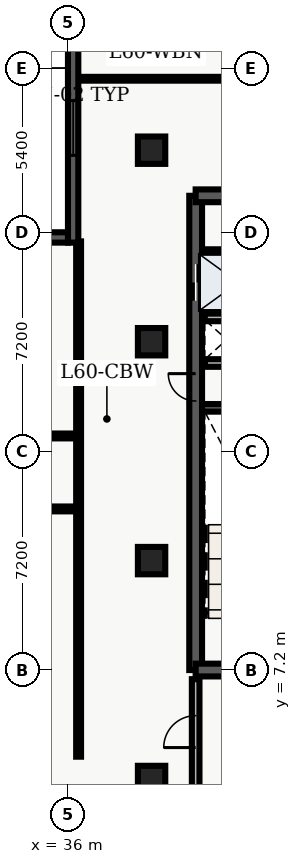
"""IFC4 building model, lengths in metres.
Left out: names, types, materials, properties, quantities, classifications, styles, units other than length and angle.
Written with IfcOpenShell. Run it as: python <this file> out.ifc"""

import sys

from ifc_helpers import new_model, entity, si_unit, converted_unit, direction, frame, origin_with_axes, origin_2d_with_axis, place, context, subcontext, project, spatial, polyline, rectangle, outline, extrude, element, fill, save


model = new_model("IFC4")
c1 = context("Model", 3, precision=1e-05, world=origin_with_axes(), true_north=direction((0.0, 1.0)))
c2 = subcontext(c1, "Body", "Model", "MODEL_VIEW")
j1 = project(units=[si_unit("LENGTHUNIT", "METRE"), converted_unit("PLANEANGLEUNIT", "DEGREE", entity("IfcPlaneAngleMeasure", 0.017), si_unit("PLANEANGLEUNIT", "RADIAN"), dimensions=[0, 0, 0, 0, 0, 0, 0])], contexts=[c1])
p1 = place(None, origin_with_axes())
s1 = spatial("IfcSite", under=j1, at=p1, CompositionType="ELEMENT")
p2 = place(p1, origin_with_axes())
s2 = spatial("IfcBuilding", under=s1, at=p2, CompositionType="ELEMENT")
p3 = place(p2, frame((0.0, 0.0, 244.2), z_axis=(0.0, 0.0, 1.0), x_axis=(1.0, 0.0, 0.0)))
s3 = spatial("IfcBuildingStorey", under=s2, at=p3, CompositionType="ELEMENT", Elevation=244.2)
p4 = place(p3, frame((40.2, 7.2, 0.0), z_axis=(0.0, 0.0, 1.0), x_axis=(0.0, 1.0, 0.0)))
e1 = element("IfcWall", 1, at=p4, inside=s3, PredefinedType="SHEAR", context=c2, shape_type="SweptSolid", body=[
    extrude(outline(polyline([(0.0, -0.21), (15.6, -0.21), (15.6, 0.21), (0.0, 0.21), (0.0, -0.21)])), origin_with_axes(), (0.0, 0.0, 1.0), 3.6),
])
p5 = place(p4, frame((12.75, 0.0, 0.0), z_axis=(0.0, 0.0, 1.0), x_axis=(1.0, 0.0, 0.0)))
e2 = element("IfcOpeningElement", 2, at=p5, cuts=e1, PredefinedType="OPENING", context=c2, shape_type="SweptSolid", body=[
    extrude(rectangle(XDim=1.2, YDim=0.44, at=origin_2d_with_axis()), origin_with_axes(), (0.0, 0.0, 1.0), 2.15),
])
p6 = place(p4, frame((9.3, 0.0, 0.0), z_axis=(0.0, 0.0, 1.0), x_axis=(1.0, 0.0, 0.0)))
e3 = element("IfcOpeningElement", 3, at=p6, cuts=e1, PredefinedType="OPENING", context=c2, shape_type="SweptSolid", body=[
    extrude(rectangle(XDim=0.9, YDim=0.44, at=origin_2d_with_axis()), origin_with_axes(), (0.0, 0.0, 1.0), 2.15),
])
p7 = place(p3, frame((40.2, 7.2, 0.0), z_axis=(0.0, 0.0, 1.0), x_axis=(1.0, 0.0, 0.0)))
e4 = element("IfcWall", 4, at=p7, inside=s3, PredefinedType="SHEAR", context=c2, shape_type="SweptSolid", body=[
    extrude(outline(polyline([(0.0, -0.21), (7.85, -0.21), (7.85, 0.21), (0.0, 0.21), (0.0, -0.21)])), origin_with_axes(), (0.0, 0.0, 1.0), 3.6),
])
p8 = place(p7, frame((2.175, 0.0, 0.0), z_axis=(0.0, 0.0, 1.0), x_axis=(1.0, 0.0, 0.0)))
e5 = element("IfcOpeningElement", 5, at=p8, cuts=e4, PredefinedType="OPENING", context=c2, shape_type="SweptSolid", body=[
    extrude(rectangle(XDim=1.05, YDim=0.44, at=origin_2d_with_axis()), origin_with_axes(), (0.0, 0.0, 1.0), 2.15),
])
p9 = place(p3, frame((40.2, 22.8, 0.0), z_axis=(0.0, 0.0, 1.0), x_axis=(1.0, 0.0, 0.0)))
e6 = element("IfcWall", 6, at=p9, inside=s3, PredefinedType="SHEAR", context=c2, shape_type="SweptSolid", body=[
    extrude(outline(polyline([(0.0, -0.21), (7.85, -0.21), (7.85, 0.21), (0.0, 0.21), (0.0, -0.21)])), origin_with_axes(), (0.0, 0.0, 1.0), 3.6),
])
p10 = place(p9, frame((5.775, 0.0, 0.0), z_axis=(0.0, 0.0, 1.0), x_axis=(1.0, 0.0, 0.0)))
e7 = element("IfcOpeningElement", 7, at=p10, cuts=e6, PredefinedType="OPENING", context=c2, shape_type="SweptSolid", body=[
    extrude(rectangle(XDim=1.05, YDim=0.44, at=origin_2d_with_axis()), origin_with_axes(), (0.0, 0.0, 1.0), 2.15),
])
p11 = place(p9, frame((2.15, 0.0, 0.0), z_axis=(0.0, 0.0, 1.0), x_axis=(1.0, 0.0, 0.0)))
e8 = element("IfcOpeningElement", 8, at=p11, cuts=e6, PredefinedType="OPENING", context=c2, shape_type="SweptSolid", body=[
    extrude(rectangle(XDim=0.9, YDim=0.44, at=origin_2d_with_axis()), origin_with_axes(), (0.0, 0.0, 1.0), 2.15),
])
p12 = place(p3, frame((40.41, 15.825, 0.0), z_axis=(0.0, 0.0, 1.0), x_axis=(1.0, 0.0, 0.0)))
e9 = element("IfcWall", 9, at=p12, inside=s3, PredefinedType="SHEAR", context=c2, shape_type="SweptSolid", body=[
    extrude(outline(polyline([(0.0, -0.125), (3.59, -0.125), (3.59, 0.125), (0.0, 0.125), (0.0, -0.125)])), origin_with_axes(), (0.0, 0.0, 1.0), 3.6),
])
p13 = place(p3, frame((40.5, 17.3, 0.0), z_axis=(0.0, 0.0, 1.0), x_axis=(1.0, 0.0, 0.0)))
e10 = element("IfcWall", 10, at=p13, inside=s3, PredefinedType="SOLIDWALL", context=c2, shape_type="SweptSolid", body=[
    extrude(outline(polyline([(0.0, -0.125), (3.5, -0.125), (3.5, 0.125), (0.0, 0.125), (0.0, -0.125)])), origin_with_axes(), (0.0, 0.0, 1.0), 2.64),
])
p14 = place(p13, frame((2.4, 0.0, 0.0), z_axis=(0.0, 0.0, 1.0), x_axis=(1.0, 0.0, 0.0)))
e11 = element("IfcOpeningElement", 11, at=p14, cuts=e10, PredefinedType="OPENING", context=c2, shape_type="SweptSolid", body=[
    extrude(rectangle(XDim=0.9, YDim=0.27, at=origin_2d_with_axis()), origin_with_axes(), (0.0, 0.0, 1.0), 2.15),
])
p15 = place(p3, frame((40.5, 18.8, 0.0), z_axis=(0.0, 0.0, 1.0), x_axis=(1.0, 0.0, 0.0)))
e12 = element("IfcWall", 12, at=p15, inside=s3, PredefinedType="SOLIDWALL", context=c2, shape_type="SweptSolid", body=[
    extrude(outline(polyline([(0.0, -0.125), (3.5, -0.125), (3.5, 0.125), (0.0, 0.125), (0.0, -0.125)])), origin_with_axes(), (0.0, 0.0, 1.0), 2.64),
])
p16 = place(p3, frame((40.2, 3.1, 0.0), z_axis=(0.0, 0.0, 1.0), x_axis=(0.0, 1.0, 0.0)))
e13 = element("IfcWall", 13, at=p16, inside=s3, PredefinedType="SOLIDWALL", context=c2, shape_type="SweptSolid", body=[
    extrude(outline(polyline([(0.0, -0.125), (3.8, -0.125), (3.8, 0.125), (0.0, 0.125), (0.0, -0.125)])), origin_with_axes(), (0.0, 0.0, 1.0), 2.64),
])
p17 = place(p16, frame((2.075, 0.0, 0.0), z_axis=(0.0, 0.0, 1.0), x_axis=(1.0, 0.0, 0.0)))
e14 = element("IfcOpeningElement", 14, at=p17, cuts=e13, PredefinedType="OPENING", context=c2, shape_type="SweptSolid", body=[
    extrude(rectangle(XDim=1.05, YDim=0.27, at=origin_2d_with_axis()), origin_with_axes(), (0.0, 0.0, 1.0), 2.15),
])
for number, where, z_axis, x_axis in (
    (15, (38.75, 3.6, 0.0), (0.0, 0.0, 1.0), (1.0, 0.0, 0.0)),
    (16, (38.75, 10.8, 0.0), (0.0, 0.0, 1.0), (1.0, 0.0, 0.0)),
    (17, (38.75, 18.0, 0.0), (0.0, 0.0, 1.0), (1.0, 0.0, 0.0)),
    (18, (38.75, 24.3, 0.0), (0.0, 0.0, 1.0), (1.0, 0.0, 0.0)),
):
    element("IfcColumn", number, at=place(p3, frame(where, z_axis=z_axis, x_axis=x_axis)), inside=s3, PredefinedType="COLUMN", context=c2, shape_type="SweptSolid", body=[
        extrude(rectangle(XDim=0.9, YDim=0.9, at=origin_2d_with_axis()), origin_with_axes(), (0.0, 0.0, 1.0), 3.9),
    ])
p18 = place(p3, frame((40.5, 20.96, 0.0), z_axis=(0.0, 0.0, 1.0), x_axis=(1.0, 0.0, 0.0)))
e19 = element("IfcWall", 19, at=p18, inside=s3, PredefinedType="PARTITIONING", context=c2, shape_type="SweptSolid", body=[
    extrude(outline(polyline([(0.0, -0.08), (3.5, -0.08), (3.5, 0.08), (0.0, 0.08), (0.0, -0.08)])), origin_with_axes(), (0.0, 0.0, 1.0), 2.64),
])
p19 = place(p3, frame((20.3, 12.5, 0.0), z_axis=(0.0, 0.0, 1.0), x_axis=(1.0, 0.0, 0.0)))
e20 = element("IfcWall", 20, at=p19, inside=s3, PredefinedType="PARTITIONING", context=c2, shape_type="SweptSolid", body=[
    extrude(outline(polyline([(0.0, -0.08), (16.05, -0.08), (16.05, 0.08), (0.0, 0.08), (0.0, -0.08)])), origin_with_axes(), (0.0, 0.0, 1.0), 2.64),
])
p20 = place(p19, frame((8.075, 0.0, 0.0), z_axis=(0.0, 0.0, 1.0), x_axis=(1.0, 0.0, 0.0)))
e21 = element("IfcOpeningElement", 21, at=p20, cuts=e20, PredefinedType="OPENING", context=c2, shape_type="SweptSolid", body=[
    extrude(rectangle(XDim=1.0, YDim=0.18, at=origin_2d_with_axis()), origin_with_axes(), (0.0, 0.0, 1.0), 2.15),
])
p21 = place(p3, frame((20.3, 14.9, 0.0), z_axis=(0.0, 0.0, 1.0), x_axis=(1.0, 0.0, 0.0)))
e22 = element("IfcWall", 22, at=p21, inside=s3, PredefinedType="PARTITIONING", context=c2, shape_type="SweptSolid", body=[
    extrude(outline(polyline([(0.0, -0.08), (16.05, -0.08), (16.05, 0.08), (0.0, 0.08), (0.0, -0.08)])), origin_with_axes(), (0.0, 0.0, 1.0), 2.64),
])
p22 = place(p21, frame((1.827, 0.0, 0.0), z_axis=(0.0, 0.0, 1.0), x_axis=(1.0, 0.0, 0.0)))
e23 = element("IfcOpeningElement", 23, at=p22, cuts=e22, PredefinedType="OPENING", context=c2, shape_type="SweptSolid", body=[
    extrude(rectangle(XDim=1.0, YDim=0.18, at=origin_2d_with_axis()), origin_with_axes(), (0.0, 0.0, 1.0), 2.15),
])
p23 = place(p21, frame((5.386, 0.0, 0.0), z_axis=(0.0, 0.0, 1.0), x_axis=(1.0, 0.0, 0.0)))
e24 = element("IfcOpeningElement", 24, at=p23, cuts=e22, PredefinedType="OPENING", context=c2, shape_type="SweptSolid", body=[
    extrude(rectangle(XDim=1.0, YDim=0.18, at=origin_2d_with_axis()), origin_with_axes(), (0.0, 0.0, 1.0), 2.15),
])
p24 = place(p21, frame((9.236, 0.0, 0.0), z_axis=(0.0, 0.0, 1.0), x_axis=(1.0, 0.0, 0.0)))
e25 = element("IfcOpeningElement", 25, at=p24, cuts=e22, PredefinedType="OPENING", context=c2, shape_type="SweptSolid", body=[
    extrude(rectangle(XDim=1.0, YDim=0.18, at=origin_2d_with_axis()), origin_with_axes(), (0.0, 0.0, 1.0), 2.15),
])
p25 = place(p21, frame((13.572, 0.0, 0.0), z_axis=(0.0, 0.0, 1.0), x_axis=(1.0, 0.0, 0.0)))
e26 = element("IfcOpeningElement", 26, at=p25, cuts=e22, PredefinedType="OPENING", context=c2, shape_type="SweptSolid", body=[
    extrude(rectangle(XDim=1.0, YDim=0.18, at=origin_2d_with_axis()), origin_with_axes(), (0.0, 0.0, 1.0), 2.15),
])
p26 = place(p3, frame((36.35, 4.35, 0.0), z_axis=(0.0, 0.0, 1.0), x_axis=(0.0, 1.0, 0.0)))
e27 = element("IfcWall", 27, at=p26, inside=s3, PredefinedType="PARTITIONING", context=c2, shape_type="SweptSolid", body=[
    extrude(outline(polyline([(0.0, -0.08), (16.95, -0.08), (16.95, 0.08), (0.0, 0.08), (0.0, -0.08)])), origin_with_axes(), (0.0, 0.0, 1.0), 2.64),
])
p27 = place(p3, frame((36.335, 26.65, 0.0), z_axis=(0.0, 0.0, 1.0), x_axis=(1.0, 0.0, 0.0)))
e28 = element("IfcWall", 28, at=p27, inside=s3, PredefinedType="PARTITIONING", context=c2, shape_type="SweptSolid", body=[
    extrude(outline(polyline([(0.0, -0.062), (11.195, -0.062), (11.195, 0.062), (0.0, 0.062), (0.0, -0.062)])), origin_with_axes(), (0.0, 0.0, 1.0), 2.64),
])
p28 = place(p27, frame((6.665, 0.0, 0.0), z_axis=(0.0, 0.0, 1.0), x_axis=(1.0, 0.0, 0.0)))
e29 = element("IfcOpeningElement", 29, at=p28, cuts=e28, PredefinedType="OPENING", context=c2, shape_type="SweptSolid", body=[
    extrude(rectangle(XDim=1.0, YDim=0.145, at=origin_2d_with_axis()), origin_with_axes(), (0.0, 0.0, 1.0), 2.15),
])
p29 = place(p3, frame((36.17, 21.26, 0.0), z_axis=(0.0, 0.0, 1.0), x_axis=(0.0, 1.0, 0.0)))
e30 = element("IfcWall", 30, at=p29, inside=s3, PredefinedType="SOLIDWALL", context=c2, shape_type="SweptSolid", body=[
    extrude(outline(polyline([(0.0, -0.17), (7.54, -0.17), (7.54, 0.17), (0.0, 0.17), (0.0, -0.17)])), origin_with_axes(), (0.0, 0.0, 1.0), 3.6),
])
p30 = place(p29, frame((3.77, 0.0, 0.45), z_axis=(0.0, 0.0, 1.0), x_axis=(1.0, 0.0, 0.0)))
e31 = element("IfcOpeningElement", 31, at=p30, cuts=e30, PredefinedType="OPENING", context=c2, shape_type="SweptSolid", body=[
    extrude(rectangle(XDim=1.8, YDim=0.36, at=origin_2d_with_axis()), origin_with_axes(), (0.0, 0.0, 1.0), 2.1),
])
p31 = place(p3, frame((32.06, 21.43, 0.0), z_axis=(0.0, 0.0, 1.0), x_axis=(1.0, 0.0, 0.0)))
e32 = element("IfcWall", 32, at=p31, inside=s3, PredefinedType="SOLIDWALL", context=c2, shape_type="SweptSolid", body=[
    extrude(outline(polyline([(0.0, -0.17), (3.94, -0.17), (3.94, 0.17), (0.0, 0.17), (0.0, -0.17)])), origin_with_axes(), (0.0, 0.0, 1.0), 3.6),
])
p32 = place(p4, frame((12.75, 0.0, 0.0), z_axis=(0.0, 0.0, 1.0), x_axis=(1.0, 0.0, 0.0)))
e33 = element("IfcDoor", 33, at=p32, inside=s3, OperationType="DOUBLE_DOOR_SLIDING", PredefinedType="DOOR", context=c2, shape_type="SweptSolid", body=[
    extrude(rectangle(XDim=1.2, YDim=0.09, at=origin_2d_with_axis()), origin_with_axes(), (0.0, 0.0, 1.0), 2.15),
])
fill(e2, e33)
p33 = place(p4, frame((9.3, 0.0, 0.0), z_axis=(0.0, 0.0, 1.0), x_axis=(1.0, 0.0, 0.0)))
e34 = element("IfcDoor", 34, at=p33, inside=s3, OperationType="SINGLE_SWING_RIGHT", PredefinedType="DOOR", context=c2, shape_type="SweptSolid", body=[
    extrude(rectangle(XDim=0.9, YDim=0.09, at=origin_2d_with_axis()), origin_with_axes(), (0.0, 0.0, 1.0), 2.15),
])
fill(e3, e34)
p34 = place(p16, frame((2.075, 0.0, 0.0), z_axis=(0.0, 0.0, 1.0), x_axis=(1.0, 0.0, 0.0)))
e35 = element("IfcDoor", 35, at=p34, inside=s3, OperationType="SINGLE_SWING_LEFT", PredefinedType="DOOR", context=c2, shape_type="SweptSolid", body=[
    extrude(rectangle(XDim=1.05, YDim=0.09, at=origin_2d_with_axis()), origin_with_axes(), (0.0, 0.0, 1.0), 2.15),
])
fill(e14, e35)
p35 = place(p29, frame((3.77, 0.0, 0.45), z_axis=(0.0, 0.0, 1.0), x_axis=(1.0, 0.0, 0.0)))
e36 = element("IfcWindow", 36, at=p35, inside=s3, PredefinedType="WINDOW", context=c2, shape_type="SweptSolid", body=[
    extrude(rectangle(XDim=1.8, YDim=0.09, at=origin_2d_with_axis()), origin_with_axes(), (0.0, 0.0, 1.0), 2.1),
])
fill(e31, e36)
save(model, sys.argv[1])
